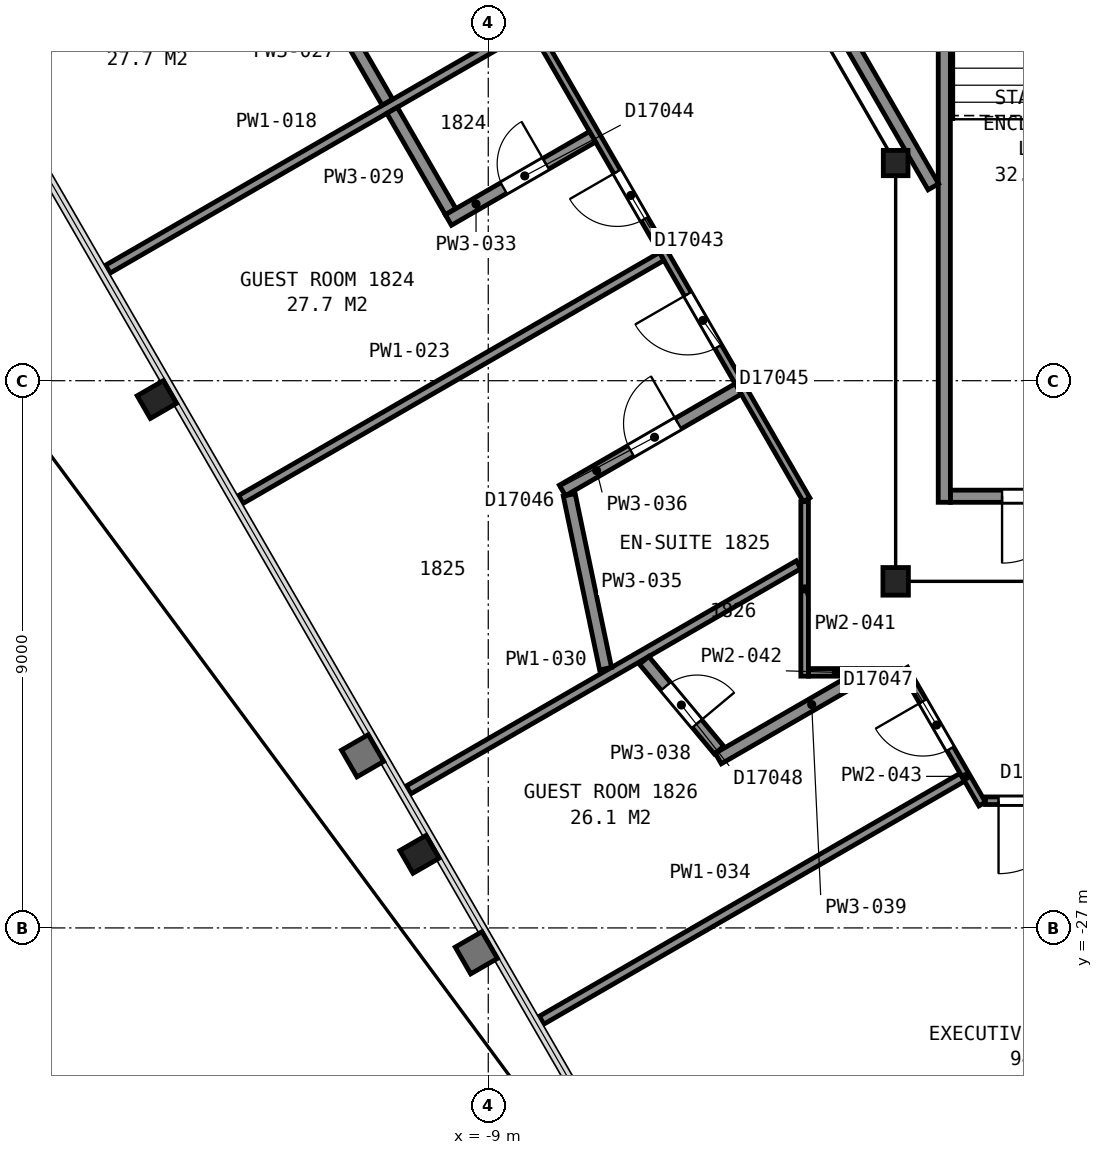
"""IFC4 building model, lengths in metres.
Left out: names, types, materials, properties, quantities, classifications, styles, units other than length and angle.
Written with IfcOpenShell. Run it as: python <this file> out.ifc"""

import sys

from ifc_helpers import new_model, si_unit, direction, frame, frame_2d, origin, origin_2d, place, context, subcontext, project, spatial, rectangle, i_section, extrude, element, fill, save


model = new_model("IFC4")
c1 = context("Model", 3, precision=1e-05, world=origin(), true_north=direction((0.0, 1.0)))
c2 = subcontext(c1, "Body", "Model", "MODEL_VIEW")
j1 = project(units=[si_unit("LENGTHUNIT", "METRE"), si_unit("PLANEANGLEUNIT", "RADIAN")], contexts=[c1])
p1 = place(None, origin())
s1 = spatial("IfcSite", under=j1, at=p1, CompositionType="ELEMENT")
p2 = place(p1, origin())
s2 = spatial("IfcBuilding", under=s1, at=p2, CompositionType="ELEMENT")
p3 = place(p2, frame((0.0, 0.0, 80.0)))
s3 = spatial("IfcBuildingStorey", under=s2, at=p3, CompositionType="ELEMENT", Elevation=80.0)
for number, where, z_axis, x_axis in (
    (1, (-14.45, -18.31, 0.0), (0.0, 0.0, 1.0), (-0.5, 0.866, 0.0)),
    (2, (-10.13, -25.79, 0.0), (0.0, 0.0, 1.0), (-0.5, 0.866, 0.0)),
):
    element("IfcColumn", number, at=place(p3, frame(where, z_axis=z_axis, x_axis=x_axis)), inside=s3, PredefinedType="COLUMN", context=c2, shape_type="SweptSolid", body=[
        extrude(i_section(OverallWidth=0.432, OverallDepth=0.498, WebThickness=0.056, FlangeThickness=0.089, FilletRadius=0.015, at=origin_2d()), origin(), (0.0, 0.0, 1.0), 3.6),
    ])
p4 = place(p3, frame((-2.3, -14.42, 0.0), z_axis=(0.0, 0.0, 1.0), x_axis=(1.0, 0.0, 0.0)))
e3 = element("IfcColumn", 3, at=p4, inside=s3, PredefinedType="COLUMN", context=c2, shape_type="SweptSolid", body=[
    extrude(i_section(OverallWidth=0.406, OverallDepth=0.417, WebThickness=0.03, FlangeThickness=0.048, FilletRadius=0.015, at=origin_2d()), origin(), (0.0, 0.0, 1.0), 3.6),
])
p5 = place(p3, frame((-2.3, -21.3, 0.0), z_axis=(0.0, 0.0, 1.0), x_axis=(-1.0, 0.0, 0.0)))
e4 = element("IfcColumn", 4, at=p5, inside=s3, PredefinedType="COLUMN", context=c2, shape_type="SweptSolid", body=[
    extrude(i_section(OverallWidth=0.419, OverallDepth=0.455, WebThickness=0.042, FlangeThickness=0.068, FilletRadius=0.015, at=origin_2d()), origin(), (0.0, 0.0, 1.0), 3.6),
])
p6 = place(p3, frame((-1.4, -19.9, 0.0), z_axis=(0.0, 0.0, 1.0), x_axis=(1.0, 0.0, 0.0)))
e5 = element("IfcWall", 5, at=p6, inside=s3, PredefinedType="PARTITIONING", context=c2, shape_type="SweptSolid", body=[
    extrude(rectangle(XDim=2.8, YDim=0.2, at=frame_2d((1.4, 0.0))), origin(), (0.0, 0.0, 1.0), 3.35),
])
p7 = place(p6, frame((0.85, 0.0, 0.0)))
e6 = element("IfcOpeningElement", 6, at=p7, cuts=e5, PredefinedType="OPENING", context=c2, shape_type="SweptSolid", body=[
    extrude(rectangle(XDim=1.1, YDim=2.1, at=frame_2d((0.55, 1.05))), frame((0.0, 0.11, 0.0), z_axis=(0.0, -1.0, 0.0), x_axis=(1.0, 0.0, 0.0)), (0.0, 0.0, 1.0), 0.22),
])
p8 = place(p3, frame((-1.5, -8.0, 0.0), z_axis=(0.0, 0.0, 1.0), x_axis=(0.0, -1.0, 0.0)))
e7 = element("IfcWall", 7, at=p8, inside=s3, PredefinedType="PARTITIONING", context=c2, shape_type="SweptSolid", body=[
    extrude(rectangle(XDim=12.0, YDim=0.2, at=frame_2d((6.0, 0.0))), origin(), (0.0, 0.0, 1.0), 3.35),
])
p9 = place(p3, frame((-13.664, 5.946, 0.0), z_axis=(0.0, 0.0, 1.0), x_axis=(0.499994327219, -0.866028678941, 0.0)))
e8 = element("IfcWall", 8, at=p9, inside=s3, PredefinedType="PARTITIONING", context=c2, shape_type="SweptSolid", body=[
    extrude(rectangle(XDim=23.968, YDim=0.2, at=frame_2d((11.984, 0.0))), origin(), (0.0, 0.0, 1.0), 3.35),
])
p10 = place(p3, frame((-3.766, -19.958, 0.0), z_axis=(0.0, 0.0, 1.0), x_axis=(-0.50002170027, 0.866012874765, 0.0)))
e9 = element("IfcWall", 9, at=p10, inside=s3, PredefinedType="PARTITIONING", context=c2, shape_type="SweptSolid", body=[
    extrude(rectangle(XDim=31.379, YDim=0.125, at=frame_2d((15.69, 0.0))), origin(), (0.0, 0.0, 1.0), 2.613),
])
p11 = place(p10, frame((25.28, 0.0, 0.0)))
e10 = element("IfcOpeningElement", 10, at=p11, cuts=e9, PredefinedType="OPENING", context=c2, shape_type="SweptSolid", body=[
    extrude(rectangle(XDim=1.5, YDim=2.1, at=frame_2d((0.75, 1.05))), frame((0.0, 0.073, 0.0), z_axis=(0.0, -1.0, 0.0), x_axis=(1.0, 0.0, 0.0)), (0.0, 0.0, 1.0), 0.145),
])
p12 = place(p10, frame((21.124, 0.0, 0.0)))
e11 = element("IfcOpeningElement", 11, at=p12, cuts=e9, PredefinedType="OPENING", context=c2, shape_type="SweptSolid", body=[
    extrude(rectangle(XDim=0.9, YDim=2.1, at=frame_2d((0.45, 1.05))), frame((0.0, 0.073, 0.0), z_axis=(0.0, -1.0, 0.0), x_axis=(1.0, 0.0, 0.0)), (0.0, 0.0, 1.0), 0.145),
])
p13 = place(p10, frame((14.349, 0.0, 0.0)))
e12 = element("IfcOpeningElement", 12, at=p13, cuts=e9, PredefinedType="OPENING", context=c2, shape_type="SweptSolid", body=[
    extrude(rectangle(XDim=0.9, YDim=2.1, at=frame_2d((0.45, 1.05))), frame((0.0, 0.073, 0.0), z_axis=(0.0, -1.0, 0.0), x_axis=(1.0, 0.0, 0.0)), (0.0, 0.0, 1.0), 0.145),
])
p14 = place(p10, frame((11.804, 0.0, 0.0)))
e13 = element("IfcOpeningElement", 13, at=p14, cuts=e9, PredefinedType="OPENING", context=c2, shape_type="SweptSolid", body=[
    extrude(rectangle(XDim=0.9, YDim=2.1, at=frame_2d((0.45, 1.05))), frame((0.0, 0.073, 0.0), z_axis=(0.0, -1.0, 0.0), x_axis=(1.0, 0.0, 0.0)), (0.0, 0.0, 1.0), 0.145),
])
p15 = place(p10, frame((5.33, 0.0, 0.0)))
e14 = element("IfcOpeningElement", 14, at=p15, cuts=e9, PredefinedType="OPENING", context=c2, shape_type="SweptSolid", body=[
    extrude(rectangle(XDim=0.9, YDim=2.1, at=frame_2d((0.45, 1.05))), frame((0.0, 0.073, 0.0), z_axis=(0.0, -1.0, 0.0), x_axis=(1.0, 0.0, 0.0)), (0.0, 0.0, 1.0), 0.145),
])
p16 = place(p10, frame((2.906, 0.0, 0.0)))
e15 = element("IfcOpeningElement", 15, at=p16, cuts=e9, PredefinedType="OPENING", context=c2, shape_type="SweptSolid", body=[
    extrude(rectangle(XDim=1.0, YDim=2.1, at=frame_2d((0.5, 1.05))), frame((0.0, 0.073, 0.0), z_axis=(0.0, -1.0, 0.0), x_axis=(1.0, 0.0, 0.0)), (0.0, 0.0, 1.0), 0.145),
])
for number, where, z_axis, x_axis in (
    (16, (-15.256, -16.165, 0.0), (0.0, 0.0, 1.0), (0.866, 0.5, 0.0)),
    (17, (-13.069, -19.953, 0.0), (0.0, 0.0, 1.0), (0.866, 0.5, 0.0)),
):
    element("IfcWall", number, at=place(p3, frame(where, z_axis=z_axis, x_axis=x_axis)), inside=s3, PredefinedType="PARTITIONING", context=c2, shape_type="SweptSolid", body=[
        extrude(rectangle(XDim=7.992, YDim=0.15, at=frame_2d((3.996, 0.0))), origin(), (0.0, 0.0, 1.0), 2.613),
    ])
p17 = place(p3, frame((-11.619, -11.757, 0.0), z_axis=(0.0, 0.0, 1.0), x_axis=(0.500133489192, -0.865948320045, 0.0)))
e18 = element("IfcWall", 18, at=p17, inside=s3, PredefinedType="PARTITIONING", context=c2, shape_type="SweptSolid", body=[
    extrude(rectangle(XDim=1.919, YDim=0.2, at=frame_2d((0.96, 0.0))), origin(), (0.0, 0.0, 1.0), 2.613),
])
p18 = place(p3, frame((-10.582, -13.553, 0.0), z_axis=(0.0, 0.0, 1.0), x_axis=(0.499971247393, -0.866042003473, 0.0)))
e19 = element("IfcWall", 19, at=p18, inside=s3, PredefinedType="PARTITIONING", context=c2, shape_type="SweptSolid", body=[
    extrude(rectangle(XDim=1.925, YDim=0.2, at=frame_2d((0.963, 0.0))), origin(), (0.0, 0.0, 1.0), 2.613),
])
p19 = place(p3, frame((-10.311, -24.73, 0.0), z_axis=(0.0, 0.0, 1.0), x_axis=(0.8660132178, 0.500021106151, 0.0)))
e20 = element("IfcWall", 20, at=p19, inside=s3, PredefinedType="PARTITIONING", context=c2, shape_type="SweptSolid", body=[
    extrude(rectangle(XDim=7.406, YDim=0.15, at=frame_2d((3.703, 0.0))), origin(), (0.0, 0.0, 1.0), 2.613),
])
p20 = place(p3, frame((-9.656, -15.357, 0.0), z_axis=(0.0, 0.0, 1.0), x_axis=(0.866005850709, 0.50003386539, 0.0)))
e21 = element("IfcWall", 21, at=p20, inside=s3, PredefinedType="PARTITIONING", context=c2, shape_type="SweptSolid", body=[
    extrude(rectangle(XDim=2.737, YDim=0.2, at=frame_2d((1.369, 0.0))), origin(), (0.0, 0.0, 1.0), 2.613),
])
p21 = place(p20, frame((1.05, 0.0, 0.0)))
e22 = element("IfcOpeningElement", 22, at=p21, cuts=e21, PredefinedType="OPENING", context=c2, shape_type="SweptSolid", body=[
    extrude(rectangle(XDim=0.8, YDim=2.1, at=frame_2d((0.4, 1.05))), frame((0.0, 0.11, 0.0), z_axis=(0.0, -1.0, 0.0), x_axis=(1.0, 0.0, 0.0)), (0.0, 0.0, 1.0), 0.22),
])
p22 = place(p3, frame((-8.124, -28.518, 0.0), z_axis=(0.0, 0.0, 1.0), x_axis=(0.866021771655, 0.500006290979, 0.0)))
e23 = element("IfcWall", 23, at=p22, inside=s3, PredefinedType="PARTITIONING", context=c2, shape_type="SweptSolid", body=[
    extrude(rectangle(XDim=7.992, YDim=0.15, at=frame_2d((3.996, 0.0))), origin(), (0.0, 0.0, 1.0), 2.613),
])
p23 = place(p3, frame((-7.668, -19.877, 0.0), z_axis=(0.0, 0.0, 1.0), x_axis=(0.204611748063, -0.978843211426, 0.0)))
e24 = element("IfcWall", 24, at=p23, inside=s3, PredefinedType="PARTITIONING", context=c2, shape_type="SweptSolid", body=[
    extrude(rectangle(XDim=2.921, YDim=0.2, at=frame_2d((1.46, 0.0))), origin(), (0.0, 0.0, 1.0), 2.613),
])
p24 = place(p3, frame((-4.89, -18.136, 0.0), z_axis=(0.0, 0.0, 1.0), x_axis=(-0.866033317326, -0.499986293093, 0.0)))
e25 = element("IfcWall", 25, at=p24, inside=s3, PredefinedType="PARTITIONING", context=c2, shape_type="SweptSolid", body=[
    extrude(rectangle(XDim=3.337, YDim=0.2, at=frame_2d((1.669, 0.0))), origin(), (0.0, 0.0, 1.0), 2.613),
])
p25 = place(p24, frame((1.138, 0.0, 0.0)))
e26 = element("IfcOpeningElement", 26, at=p25, cuts=e25, PredefinedType="OPENING", context=c2, shape_type="SweptSolid", body=[
    extrude(rectangle(XDim=0.9, YDim=2.1, at=frame_2d((0.45, 1.05))), frame((0.0, 0.11, 0.0), z_axis=(0.0, -1.0, 0.0), x_axis=(1.0, 0.0, 0.0)), (0.0, 0.0, 1.0), 0.22),
])
p26 = place(p3, frame((-6.437, -22.6, 0.0), z_axis=(0.0, 0.0, 1.0), x_axis=(0.640970893908, -0.76756518496, 0.0)))
e27 = element("IfcWall", 27, at=p26, inside=s3, PredefinedType="PARTITIONING", context=c2, shape_type="SweptSolid", body=[
    extrude(rectangle(XDim=1.923, YDim=0.2, at=frame_2d((0.961, 0.0))), origin(), (0.0, 0.0, 1.0), 2.613),
])
p27 = place(p26, frame((0.556, 0.0, 0.0)))
e28 = element("IfcOpeningElement", 28, at=p27, cuts=e27, PredefinedType="OPENING", context=c2, shape_type="SweptSolid", body=[
    extrude(rectangle(XDim=0.8, YDim=2.1, at=frame_2d((0.4, 1.05))), frame((0.0, 0.11, 0.0), z_axis=(0.0, -1.0, 0.0), x_axis=(1.0, 0.0, 0.0)), (0.0, 0.0, 1.0), 0.22),
])
p28 = place(p3, frame((-5.218, -24.214, 0.0), z_axis=(0.0, 0.0, 1.0), x_axis=(0.865922540442, 0.500178122226, 0.0)))
e29 = element("IfcWall", 29, at=p28, inside=s3, PredefinedType="PARTITIONING", context=c2, shape_type="SweptSolid", body=[
    extrude(rectangle(XDim=2.535, YDim=0.2, at=frame_2d((1.268, 0.0))), origin(), (0.0, 0.0, 1.0), 2.613),
])
p29 = place(p3, frame((-3.797, -22.86, 0.0), z_axis=(0.0, 0.0, 1.0), x_axis=(0.0, 1.0, 0.0)))
e30 = element("IfcWall", 30, at=p29, inside=s3, PredefinedType="PARTITIONING", context=c2, shape_type="SweptSolid", body=[
    extrude(rectangle(XDim=2.871, YDim=0.125, at=frame_2d((1.435, 0.0))), origin(), (0.0, 0.0, 1.0), 2.613),
])
p30 = place(p3, frame((-3.732, -22.797, 0.0), z_axis=(0.0, 0.0, 1.0), x_axis=(1.0, 0.0, 0.0)))
e31 = element("IfcWall", 31, at=p30, inside=s3, PredefinedType="PARTITIONING", context=c2, shape_type="SweptSolid", body=[
    extrude(rectangle(XDim=1.52, YDim=0.125, at=frame_2d((0.76, 0.0))), origin(), (0.0, 0.0, 1.0), 2.613),
])
p31 = place(p3, frame((-0.877, -24.962, 0.0), z_axis=(0.0, 0.0, 1.0), x_axis=(-0.500063308241, 0.865988849669, 0.0)))
e32 = element("IfcWall", 32, at=p31, inside=s3, PredefinedType="PARTITIONING", context=c2, shape_type="SweptSolid", body=[
    extrude(rectangle(XDim=2.563, YDim=0.125, at=frame_2d((1.281, 0.0))), origin(), (0.0, 0.0, 1.0), 2.613),
])
p32 = place(p31, frame((1.05, 0.0, 0.0)))
e33 = element("IfcOpeningElement", 33, at=p32, cuts=e32, PredefinedType="OPENING", context=c2, shape_type="SweptSolid", body=[
    extrude(rectangle(XDim=0.9, YDim=2.1, at=frame_2d((0.45, 1.05))), frame((0.0, 0.073, 0.0), z_axis=(0.0, -1.0, 0.0), x_axis=(1.0, 0.0, 0.0)), (0.0, 0.0, 1.0), 0.145),
])
p33 = place(p3, frame((0.823, -24.908, 0.0), z_axis=(0.0, 0.0, 1.0), x_axis=(-1.0, 0.0, 0.0)))
e34 = element("IfcWall", 34, at=p33, inside=s3, PredefinedType="PARTITIONING", context=c2, shape_type="SweptSolid", body=[
    extrude(rectangle(XDim=1.646, YDim=0.125, at=frame_2d((0.823, 0.0))), origin(), (0.0, 0.0, 1.0), 2.613),
])
p34 = place(p33, frame((0.231, 0.0, 0.0)))
e35 = element("IfcOpeningElement", 35, at=p34, cuts=e34, PredefinedType="OPENING", context=c2, shape_type="SweptSolid", body=[
    extrude(rectangle(XDim=1.2, YDim=2.1, at=frame_2d((0.6, 1.05))), frame((0.0, 0.073, 0.0), z_axis=(0.0, -1.0, 0.0), x_axis=(1.0, 0.0, 0.0)), (0.0, 0.0, 1.0), 0.145),
])
p35 = place(p7, origin())
e36 = element("IfcDoor", 36, at=p35, inside=s3, OperationType="SINGLE_SWING_LEFT", PredefinedType="DOOR", context=c2, shape_type="SweptSolid", body=[
    extrude(rectangle(XDim=1.1, YDim=2.1, at=frame_2d((0.55, 1.05))), frame((0.0, 0.025, 0.0), z_axis=(0.0, -1.0, 0.0), x_axis=(1.0, 0.0, 0.0)), (0.0, 0.0, 1.0), 0.05),
])
fill(e6, e36)
p36 = place(p15, origin())
e37 = element("IfcDoor", 37, at=p36, inside=s3, OperationType="SINGLE_SWING_RIGHT", PredefinedType="DOOR", context=c2, shape_type="SweptSolid", body=[
    extrude(rectangle(XDim=0.9, YDim=2.1, at=frame_2d((0.45, 1.05))), frame((0.0, 0.025, 0.0), z_axis=(0.0, -1.0, 0.0), x_axis=(1.0, 0.0, 0.0)), (0.0, 0.0, 1.0), 0.05),
])
fill(e14, e37)
p37 = place(p16, origin())
e38 = element("IfcDoor", 38, at=p37, inside=s3, OperationType="SINGLE_SWING_RIGHT", PredefinedType="DOOR", context=c2, shape_type="SweptSolid", body=[
    extrude(rectangle(XDim=1.0, YDim=2.1, at=frame_2d((0.5, 1.05))), frame((0.0, 0.025, 0.0), z_axis=(0.0, -1.0, 0.0), x_axis=(1.0, 0.0, 0.0)), (0.0, 0.0, 1.0), 0.05),
])
fill(e15, e38)
p38 = place(p21, origin())
e39 = element("IfcDoor", 39, at=p38, inside=s3, OperationType="SINGLE_SWING_RIGHT", PredefinedType="DOOR", context=c2, shape_type="SweptSolid", body=[
    extrude(rectangle(XDim=0.8, YDim=2.1, at=frame_2d((0.4, 1.05))), frame((0.0, 0.025, 0.0), z_axis=(0.0, -1.0, 0.0), x_axis=(1.0, 0.0, 0.0)), (0.0, 0.0, 1.0), 0.05),
])
fill(e22, e39)
p39 = place(p25, origin())
e40 = element("IfcDoor", 40, at=p39, inside=s3, OperationType="SINGLE_SWING_LEFT", PredefinedType="DOOR", context=c2, shape_type="SweptSolid", body=[
    extrude(rectangle(XDim=0.9, YDim=2.1, at=frame_2d((0.45, 1.05))), frame((0.0, 0.025, 0.0), z_axis=(0.0, -1.0, 0.0), x_axis=(1.0, 0.0, 0.0)), (0.0, 0.0, 1.0), 0.05),
])
fill(e26, e40)
p40 = place(p27, origin())
e41 = element("IfcDoor", 41, at=p40, inside=s3, OperationType="SINGLE_SWING_RIGHT", PredefinedType="DOOR", context=c2, shape_type="SweptSolid", body=[
    extrude(rectangle(XDim=0.8, YDim=2.1, at=frame_2d((0.4, 1.05))), frame((0.0, 0.025, 0.0), z_axis=(0.0, -1.0, 0.0), x_axis=(1.0, 0.0, 0.0)), (0.0, 0.0, 1.0), 0.05),
])
fill(e28, e41)
p41 = place(p32, origin())
e42 = element("IfcDoor", 42, at=p41, inside=s3, OperationType="SINGLE_SWING_RIGHT", PredefinedType="DOOR", context=c2, shape_type="SweptSolid", body=[
    extrude(rectangle(XDim=0.9, YDim=2.1, at=frame_2d((0.45, 1.05))), frame((0.0, 0.025, 0.0), z_axis=(0.0, -1.0, 0.0), x_axis=(1.0, 0.0, 0.0)), (0.0, 0.0, 1.0), 0.05),
])
fill(e33, e42)
p42 = place(p34, origin())
e43 = element("IfcDoor", 43, at=p42, inside=s3, OperationType="SINGLE_SWING_RIGHT", PredefinedType="DOOR", context=c2, shape_type="SweptSolid", body=[
    extrude(rectangle(XDim=1.2, YDim=2.1, at=frame_2d((0.6, 1.05))), frame((0.0, 0.025, 0.0), z_axis=(0.0, -1.0, 0.0), x_axis=(1.0, 0.0, 0.0)), (0.0, 0.0, 1.0), 0.05),
])
fill(e35, e43)
save(model, sys.argv[1])
